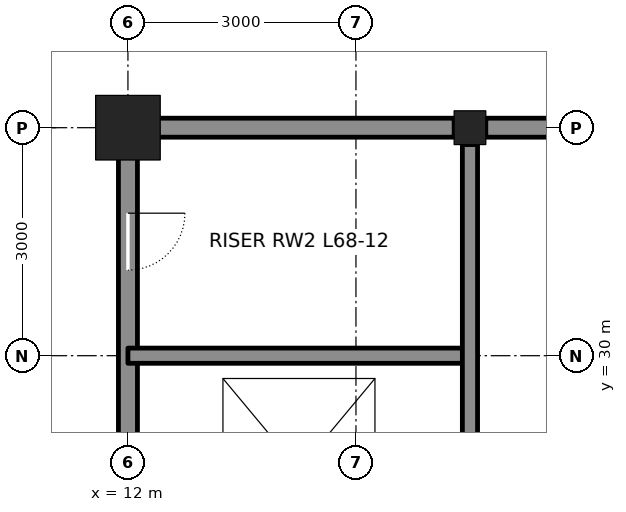
"""IFC4 building model, lengths in metres.
Left out: names, types, materials, properties, quantities, classifications, styles, units other than length and angle.
Written with IfcOpenShell. Run it as: python <this file> out.ifc"""

import sys

from ifc_helpers import new_model, si_unit, direction, frame, frame_2d, origin, origin_2d, place, context, subcontext, project, spatial, rectangle, hollow_rectangle, i_section, extrude, element, fill, save


model = new_model("IFC4")
c1 = context("Model", 3, precision=1e-05, world=origin(), true_north=direction((0.0, 1.0)))
c2 = subcontext(c1, "Body", "Model", "MODEL_VIEW")
j1 = project(units=[si_unit("LENGTHUNIT", "METRE"), si_unit("PLANEANGLEUNIT", "RADIAN")], contexts=[c1])
p1 = place(None, origin())
s1 = spatial("IfcSite", under=j1, at=p1, CompositionType="ELEMENT")
p2 = place(p1, origin())
s2 = spatial("IfcBuilding", under=s1, at=p2, CompositionType="ELEMENT")
p3 = place(p2, frame((0.0, 0.0, 306.0)))
s3 = spatial("IfcBuildingStorey", under=s2, at=p3, CompositionType="ELEMENT", Elevation=306.0)
p4 = place(p3, frame((12.0, 33.0, 0.0), z_axis=(0.0, 0.0, 1.0), x_axis=(1.0, 0.0, 0.0)))
e1 = element("IfcColumn", 1, at=p4, inside=s3, PredefinedType="COLUMN", context=c2, shape_type="SweptSolid", body=[
    extrude(hollow_rectangle(XDim=0.85, YDim=0.85, WallThickness=0.085, at=origin_2d()), origin(), (0.0, 0.0, 1.0), 5.8),
])
p5 = place(p3, frame((16.5, 33.0, 0.0), z_axis=(0.0, 0.0, 1.0), x_axis=(1.0, 0.0, 0.0)))
e2 = element("IfcColumn", 2, at=p5, inside=s3, PredefinedType="COLUMN", context=c2, shape_type="SweptSolid", body=[
    extrude(i_section(OverallWidth=0.417, OverallDepth=0.445, WebThickness=0.039, FlangeThickness=0.063, at=origin_2d()), origin(), (0.0, 0.0, 1.0), 6.0),
])
p6 = place(p3, frame((12.0, 24.222, 0.0), z_axis=(0.0, 0.0, 1.0), x_axis=(0.0, 1.0, 0.0)))
e3 = element("IfcWall", 3, at=p6, inside=s3, PredefinedType="SOLIDWALL", context=c2, shape_type="SweptSolid", body=[
    extrude(rectangle(XDim=8.528, YDim=0.25, at=frame_2d((4.264, 0.0))), origin(), (0.0, 0.0, 1.0), 4.873),
])
p7 = place(p6, frame((0.678, 0.0, 0.0)))
e4 = element("IfcOpeningElement", 4, at=p7, cuts=e3, PredefinedType="OPENING", context=c2, shape_type="SweptSolid", body=[
    extrude(rectangle(XDim=1.2, YDim=2.1, at=frame_2d((0.6, 1.05))), frame((0.0, 0.135, 0.0), z_axis=(0.0, -1.0, 0.0), x_axis=(1.0, 0.0, 0.0)), (0.0, 0.0, 1.0), 0.27),
])
p8 = place(p6, frame((6.903, 0.0, 0.0)))
e5 = element("IfcOpeningElement", 5, at=p8, cuts=e3, PredefinedType="OPENING", context=c2, shape_type="SweptSolid", body=[
    extrude(rectangle(XDim=0.75, YDim=2.1, at=frame_2d((0.375, 1.05))), frame((0.0, 0.135, 0.0), z_axis=(0.0, -1.0, 0.0), x_axis=(1.0, 0.0, 0.0)), (0.0, 0.0, 1.0), 0.27),
])
p9 = place(p3, frame((12.0, 30.0, 0.0), z_axis=(0.0, 0.0, 1.0), x_axis=(1.0, 0.0, 0.0)))
e6 = element("IfcWall", 6, at=p9, inside=s3, PredefinedType="SOLIDWALL", context=c2, shape_type="SweptSolid", body=[
    extrude(rectangle(XDim=4.5, YDim=0.2, at=frame_2d((2.25, 0.0))), origin(), (0.0, 0.0, 1.0), 5.8),
])
p10 = place(p3, frame((12.25, 33.0, 0.0), z_axis=(0.0, 0.0, 1.0), x_axis=(1.0, 0.0, 0.0)))
e7 = element("IfcWall", 7, at=p10, inside=s3, PredefinedType="SOLIDWALL", context=c2, shape_type="SweptSolid", body=[
    extrude(rectangle(XDim=4.042, YDim=0.25, at=frame_2d((2.021, 0.0))), origin(), (0.0, 0.0, 1.0), 4.941),
])
p11 = place(p3, frame((16.708, 33.0, 0.0), z_axis=(0.0, 0.0, 1.0), x_axis=(1.0, 0.0, 0.0)))
e8 = element("IfcWall", 8, at=p11, inside=s3, PredefinedType="SOLIDWALL", context=c2, shape_type="SweptSolid", body=[
    extrude(rectangle(XDim=2.583, YDim=0.25, at=frame_2d((1.292, 0.0))), origin(), (0.0, 0.0, 1.0), 4.941),
])
p12 = place(p3, frame((16.5, 24.222, 0.0), z_axis=(0.0, 0.0, 1.0), x_axis=(0.0, 1.0, 0.0)))
e9 = element("IfcWall", 9, at=p12, inside=s3, PredefinedType="SOLIDWALL", context=c2, shape_type="SweptSolid", body=[
    extrude(rectangle(XDim=8.555, YDim=0.2, at=frame_2d((4.278, 0.0))), origin(), (0.0, 0.0, 1.0), 4.873),
])
p13 = place(p8, frame((0.75, 0.0, 0.0), z_axis=(0.0, 0.0, 1.0), x_axis=(-1.0, 0.0, 0.0)))
e10 = element("IfcDoor", 10, at=p13, inside=s3, OperationType="SINGLE_SWING_LEFT", PredefinedType="DOOR", context=c2, shape_type="SweptSolid", body=[
    extrude(rectangle(XDim=0.75, YDim=2.1, at=frame_2d((0.375, 1.05))), frame((0.0, 0.025, 0.0), z_axis=(0.0, -1.0, 0.0), x_axis=(1.0, 0.0, 0.0)), (0.0, 0.0, 1.0), 0.05),
])
fill(e5, e10)
save(model, sys.argv[1])
